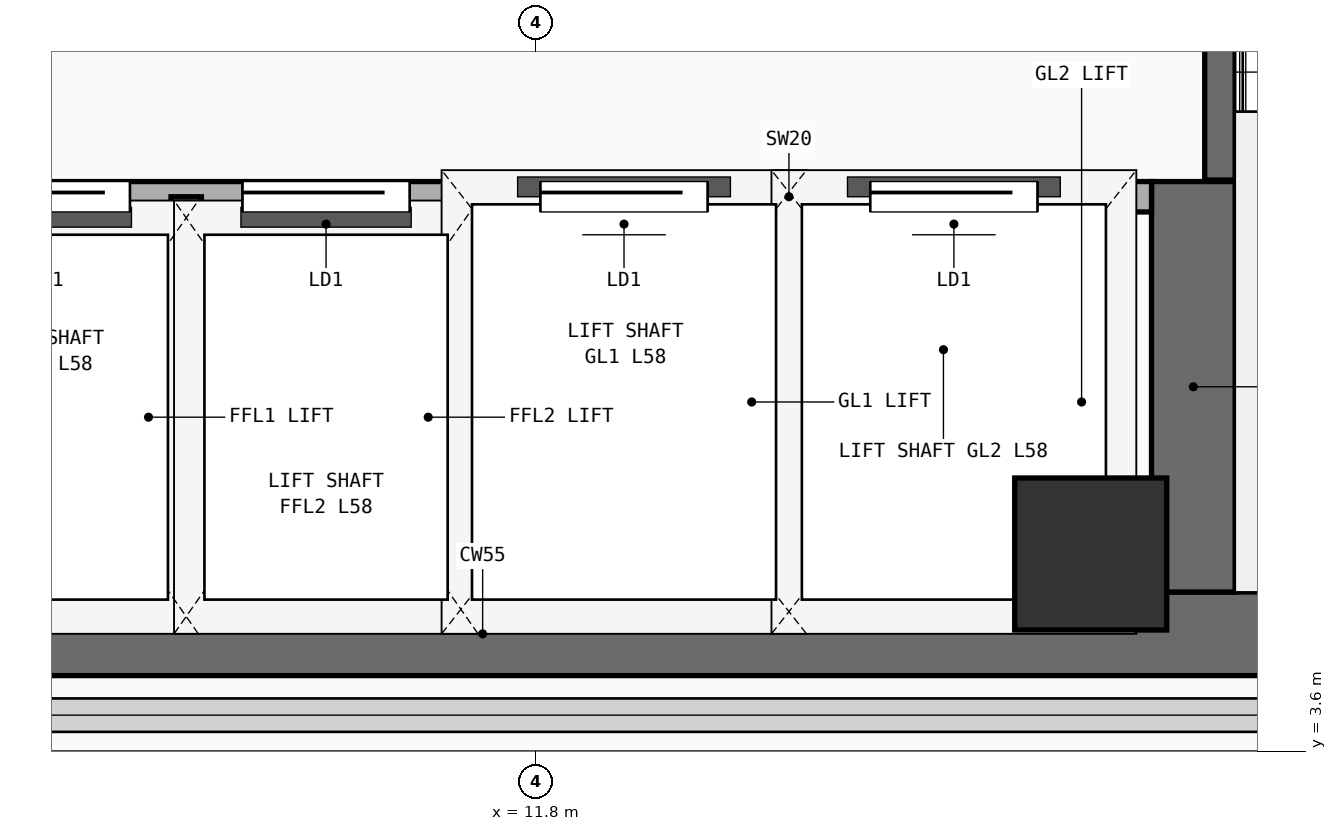
"""IFC4 building model, lengths in metres.
Left out: names, types, materials, properties, quantities, classifications, styles, units other than length and angle.
Written with IfcOpenShell. Run it as: python <this file> out.ifc"""

import sys

from ifc_helpers import new_model, si_unit, direction, frame, frame_2d, origin, origin_2d, place, context, subcontext, project, spatial, rectangle, extrude, element, fill, save


model = new_model("IFC4")
c1 = context("Model", 3, precision=1e-05, world=origin(), true_north=direction((0.0, 1.0)))
c2 = subcontext(c1, "Body", "Model", "MODEL_VIEW")
j1 = project(units=[si_unit("LENGTHUNIT", "METRE"), si_unit("PLANEANGLEUNIT", "RADIAN")], contexts=[c1])
p1 = place(None, origin())
s1 = spatial("IfcSite", under=j1, at=p1, CompositionType="ELEMENT")
p2 = place(p1, origin())
s2 = spatial("IfcBuilding", under=s1, at=p2, CompositionType="ELEMENT")
p3 = place(p2, frame((0.0, 0.0, 227.3)))
s3 = spatial("IfcBuildingStorey", under=s2, at=p3, CompositionType="ELEMENT", Elevation=227.3)
p4 = place(p3, frame((7.175, 4.375, 0.0), z_axis=(0.0, 0.0, 1.0), x_axis=(1.0, 0.0, 0.0)))
e1 = element("IfcWall", 1, at=p4, inside=s3, PredefinedType="SHEAR", context=c2, shape_type="SweptSolid", body=[
    extrude(rectangle(XDim=13.9, YDim=0.55, at=frame_2d((6.95, 0.0))), origin(), (0.0, 0.0, 1.0), 3.56),
])
p5 = place(p3, frame((16.125, 4.65, 0.0), z_axis=(0.0, 0.0, 1.0), x_axis=(0.0, 1.0, 0.0)))
e2 = element("IfcWall", 2, at=p5, inside=s3, PredefinedType="SHEAR", context=c2, shape_type="SweptSolid", body=[
    extrude(rectangle(XDim=2.7, YDim=0.55, at=frame_2d((1.35, 0.0))), origin(), (0.0, 0.0, 1.0), 3.56),
])
p6 = place(p3, frame((15.45, 4.9, 0.0), z_axis=(0.0, 0.0, 1.0), x_axis=(1.0, 0.0, 0.0)))
e3 = element("IfcColumn", 3, at=p6, inside=s3, PredefinedType="COLUMN", context=c2, shape_type="SweptSolid", body=[
    extrude(rectangle(XDim=1.0, YDim=1.0, at=origin_2d()), origin(), (0.0, 0.0, 1.0), 3.56),
])
p7 = place(p3, frame((16.3, 7.36, 0.0), z_axis=(0.0, 0.0, 1.0), x_axis=(0.0, 1.0, 0.0)))
e4 = element("IfcWall", 4, at=p7, inside=s3, PredefinedType="SHEAR", context=c2, shape_type="SweptSolid", body=[
    extrude(rectangle(XDim=2.58, YDim=0.2, at=frame_2d((1.29, 0.0))), origin(), (0.0, 0.0, 1.0), 3.56),
])
p8 = place(p3, frame((7.5, 7.25, 0.0), z_axis=(0.0, 0.0, 1.0), x_axis=(1.0, 0.0, 0.0)))
e5 = element("IfcWall", 5, at=p8, inside=s3, PredefinedType="PARTITIONING", context=c2, shape_type="SweptSolid", body=[
    extrude(rectangle(XDim=8.35, YDim=0.2, at=frame_2d((4.175, 0.0))), origin(), (0.0, 0.0, 1.0), 3.56),
])
p9 = place(p8, frame((0.53, 0.0, 0.0)))
e6 = element("IfcOpeningElement", 6, at=p9, cuts=e5, PredefinedType="OPENING", context=c2, shape_type="SweptSolid", body=[
    extrude(rectangle(XDim=1.1, YDim=2.2, at=frame_2d((0.55, 1.1))), frame((0.0, 0.11, 0.0), z_axis=(0.0, -1.0, 0.0), x_axis=(1.0, 0.0, 0.0)), (0.0, 0.0, 1.0), 0.22),
])
p10 = place(p8, frame((2.37, 0.0, 0.0)))
e7 = element("IfcOpeningElement", 7, at=p10, cuts=e5, PredefinedType="OPENING", context=c2, shape_type="SweptSolid", body=[
    extrude(rectangle(XDim=1.1, YDim=2.2, at=frame_2d((0.55, 1.1))), frame((0.0, 0.11, 0.0), z_axis=(0.0, -1.0, 0.0), x_axis=(1.0, 0.0, 0.0)), (0.0, 0.0, 1.0), 0.22),
])
p11 = place(p8, frame((4.33, 0.0, 0.0)))
e8 = element("IfcOpeningElement", 8, at=p11, cuts=e5, PredefinedType="OPENING", context=c2, shape_type="SweptSolid", body=[
    extrude(rectangle(XDim=1.1, YDim=2.2, at=frame_2d((0.55, 1.1))), frame((0.0, 0.11, 0.0), z_axis=(0.0, -1.0, 0.0), x_axis=(1.0, 0.0, 0.0)), (0.0, 0.0, 1.0), 0.22),
])
p12 = place(p8, frame((6.5, 0.0, 0.0)))
e9 = element("IfcOpeningElement", 9, at=p12, cuts=e5, PredefinedType="OPENING", context=c2, shape_type="SweptSolid", body=[
    extrude(rectangle(XDim=1.1, YDim=2.2, at=frame_2d((0.55, 1.1))), frame((0.0, 0.11, 0.0), z_axis=(0.0, -1.0, 0.0), x_axis=(1.0, 0.0, 0.0)), (0.0, 0.0, 1.0), 0.22),
])
for number, where, z_axis, x_axis in (
    (10, (9.5, 4.45, 0.0), (0.0, 0.0, 1.0), (0.0, 1.0, 0.0)),
    (11, (11.36, 4.45, 0.0), (0.0, 0.0, 1.0), (0.0, 1.0, 0.0)),
    (12, (13.46, 4.45, 0.0), (0.0, 0.0, 1.0), (0.0, 1.0, 0.0)),
):
    element("IfcWall", number, at=place(p3, frame(where, z_axis=z_axis, x_axis=x_axis)), inside=s3, PredefinedType="PARTITIONING", context=c2, shape_type="SweptSolid", body=[
        extrude(rectangle(XDim=2.8, YDim=0.2, at=frame_2d((1.4, 0.0))), origin(), (0.0, 0.0, 1.0), 3.56),
    ])
p13 = place(p9, origin())
e13 = element("IfcDoor", 13, at=p13, inside=s3, OperationType="SLIDING_TO_LEFT", PredefinedType="DOOR", context=c2, shape_type="SweptSolid", body=[
    extrude(rectangle(XDim=1.1, YDim=2.2, at=frame_2d((0.55, 1.1))), frame((0.0, 0.025, 0.0), z_axis=(0.0, -1.0, 0.0), x_axis=(1.0, 0.0, 0.0)), (0.0, 0.0, 1.0), 0.05),
])
fill(e6, e13)
p14 = place(p10, origin())
e14 = element("IfcDoor", 14, at=p14, inside=s3, OperationType="SLIDING_TO_LEFT", PredefinedType="DOOR", context=c2, shape_type="SweptSolid", body=[
    extrude(rectangle(XDim=1.1, YDim=2.2, at=frame_2d((0.55, 1.1))), frame((0.0, 0.025, 0.0), z_axis=(0.0, -1.0, 0.0), x_axis=(1.0, 0.0, 0.0)), (0.0, 0.0, 1.0), 0.05),
])
fill(e7, e14)
p15 = place(p11, origin())
e15 = element("IfcDoor", 15, at=p15, inside=s3, OperationType="SLIDING_TO_LEFT", PredefinedType="DOOR", context=c2, shape_type="SweptSolid", body=[
    extrude(rectangle(XDim=1.1, YDim=2.2, at=frame_2d((0.55, 1.1))), frame((0.0, 0.025, 0.0), z_axis=(0.0, -1.0, 0.0), x_axis=(1.0, 0.0, 0.0)), (0.0, 0.0, 1.0), 0.05),
])
fill(e8, e15)
p16 = place(p12, origin())
e16 = element("IfcDoor", 16, at=p16, inside=s3, OperationType="SLIDING_TO_LEFT", PredefinedType="DOOR", context=c2, shape_type="SweptSolid", body=[
    extrude(rectangle(XDim=1.1, YDim=2.2, at=frame_2d((0.55, 1.1))), frame((0.0, 0.025, 0.0), z_axis=(0.0, -1.0, 0.0), x_axis=(1.0, 0.0, 0.0)), (0.0, 0.0, 1.0), 0.05),
])
fill(e9, e16)
save(model, sys.argv[1])
